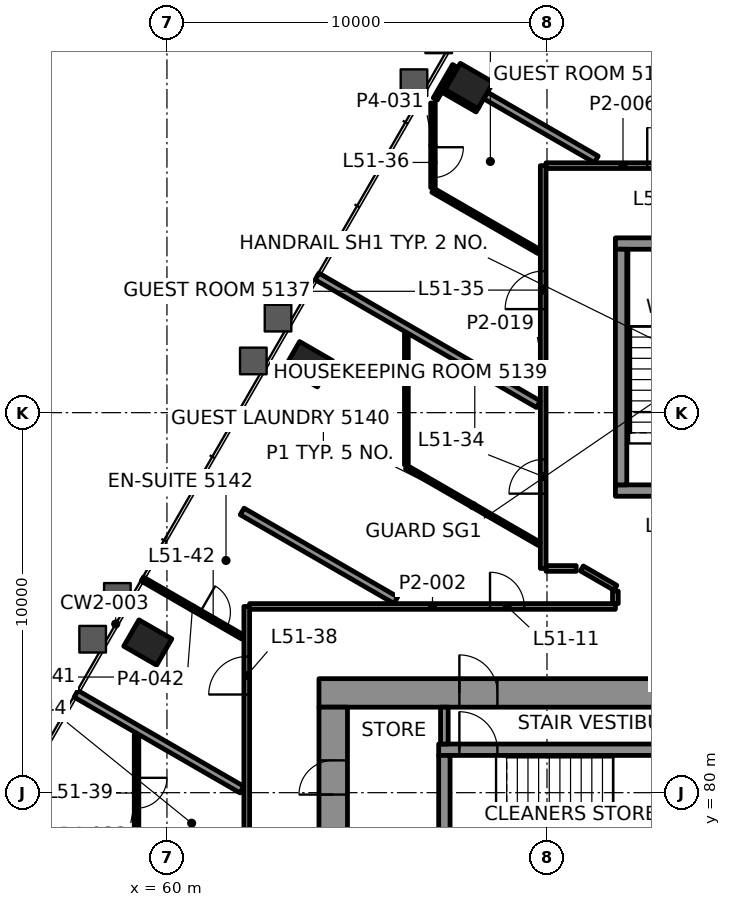
"""IFC4 building model, lengths in metres.
Left out: names, types, materials, properties, quantities, classifications, styles, units other than length and angle.
Written with IfcOpenShell. Run it as: python <this file> out.ifc"""

import sys

from ifc_helpers import new_model, si_unit, direction, frame, frame_2d, origin, origin_2d, place, context, subcontext, project, spatial, rectangle, hollow_rectangle, extrude, element, fill, save


model = new_model("IFC4")
c1 = context("Model", 3, precision=1e-05, world=origin(), true_north=direction((0.0, 1.0)))
c2 = subcontext(c1, "Body", "Model", "MODEL_VIEW")
j1 = project(units=[si_unit("LENGTHUNIT", "METRE"), si_unit("PLANEANGLEUNIT", "RADIAN")], contexts=[c1])
p1 = place(None, origin())
s1 = spatial("IfcSite", under=j1, at=p1, CompositionType="ELEMENT")
p2 = place(p1, origin())
s2 = spatial("IfcBuilding", under=s1, at=p2, CompositionType="ELEMENT")
p3 = place(p2, frame((0.0, 0.0, 218.2)))
s3 = spatial("IfcBuildingStorey", under=s2, at=p3, CompositionType="ELEMENT", Elevation=218.2)
for number, where, z_axis, x_axis in (
    (1, (67.952, 98.597, -0.0), (0.0, 0.0, 1.0), (-0.5, -0.866, 0.0)),
    (2, (63.724, 91.274, -0.0), (0.0, 0.0, 1.0), (-0.5, -0.866, 0.0)),
    (3, (59.496, 83.951, -0.0), (0.0, 0.0, 1.0), (-0.5, -0.866, 0.0)),
):
    element("IfcColumn", number, at=place(p3, frame(where, z_axis=z_axis, x_axis=x_axis)), inside=s3, PredefinedType="COLUMN", context=c2, shape_type="SweptSolid", body=[
        extrude(hollow_rectangle(XDim=0.8, YDim=1.0, WallThickness=0.05, at=origin_2d()), origin(), (0.0, 0.0, 1.0), 3.9),
    ])
p4 = place(p3, frame((64.0, 82.625, 0.0), z_axis=(0.0, 0.0, 1.0), x_axis=(1.0, 0.0, 0.0)))
e4 = element("IfcWall", 4, at=p4, inside=s3, PredefinedType="SHEAR", context=c2, shape_type="SweptSolid", body=[
    extrude(rectangle(XDim=22.0, YDim=0.75, at=frame_2d((11.0, 0.0))), origin(), (0.0, 0.0, 1.0), 3.7),
])
p5 = place(p4, frame((3.695, 0.0, 0.0)))
e5 = element("IfcOpeningElement", 5, at=p5, cuts=e4, PredefinedType="OPENING", context=c2, shape_type="SweptSolid", body=[
    extrude(rectangle(XDim=1.0, YDim=2.1, at=frame_2d((0.5, 1.05))), frame((0.0, 0.385, 0.0), z_axis=(0.0, -1.0, 0.0), x_axis=(1.0, 0.0, 0.0)), (0.0, 0.0, 1.0), 0.77),
])
p6 = place(p4, frame((17.505, 0.0, 0.0)))
e6 = element("IfcOpeningElement", 6, at=p6, cuts=e4, PredefinedType="OPENING", context=c2, shape_type="SweptSolid", body=[
    extrude(rectangle(XDim=1.0, YDim=2.1, at=frame_2d((0.5, 1.05))), frame((0.0, 0.385, 0.0), z_axis=(0.0, -1.0, 0.0), x_axis=(1.0, 0.0, 0.0)), (0.0, 0.0, 1.0), 0.77),
])
p7 = place(p4, frame((10.65, 0.0, 0.0)))
e7 = element("IfcOpeningElement", 7, at=p7, cuts=e4, PredefinedType="OPENING", context=c2, shape_type="SweptSolid", body=[
    extrude(rectangle(XDim=0.9, YDim=2.1, at=frame_2d((0.45, 1.05))), frame((0.0, 0.385, 0.0), z_axis=(0.0, -1.0, 0.0), x_axis=(1.0, 0.0, 0.0)), (0.0, 0.0, 1.0), 0.77),
])
p8 = place(p3, frame((64.375, 67.75, 0.0), z_axis=(0.0, 0.0, 1.0), x_axis=(0.0, 1.0, 0.0)))
e8 = element("IfcWall", 8, at=p8, inside=s3, PredefinedType="SHEAR", context=c2, shape_type="SweptSolid", body=[
    extrude(rectangle(XDim=14.5, YDim=0.75, at=frame_2d((7.25, 0.0))), origin(), (0.0, 0.0, 1.0), 3.7),
])
p9 = place(p8, frame((4.65, 0.0, 0.0)))
e9 = element("IfcOpeningElement", 9, at=p9, cuts=e8, PredefinedType="OPENING", context=c2, shape_type="SweptSolid", body=[
    extrude(rectangle(XDim=1.8, YDim=2.1, at=frame_2d((0.9, 1.05))), frame((0.0, 0.385, 0.0), z_axis=(0.0, -1.0, 0.0), x_axis=(1.0, 0.0, 0.0)), (0.0, 0.0, 1.0), 0.77),
])
p10 = place(p8, frame((8.5, 0.0, 0.0)))
e10 = element("IfcOpeningElement", 10, at=p10, cuts=e8, PredefinedType="OPENING", context=c2, shape_type="SweptSolid", body=[
    extrude(rectangle(XDim=0.9, YDim=2.1, at=frame_2d((0.45, 1.05))), frame((0.0, 0.385, 0.0), z_axis=(0.0, -1.0, 0.0), x_axis=(1.0, 0.0, 0.0)), (0.0, 0.0, 1.0), 0.77),
])
p11 = place(p8, frame((12.2, 0.0, 0.0)))
e11 = element("IfcOpeningElement", 11, at=p11, cuts=e8, PredefinedType="OPENING", context=c2, shape_type="SweptSolid", body=[
    extrude(rectangle(XDim=0.9, YDim=2.1, at=frame_2d((0.45, 1.05))), frame((0.0, 0.385, 0.0), z_axis=(0.0, -1.0, 0.0), x_axis=(1.0, 0.0, 0.0)), (0.0, 0.0, 1.0), 0.77),
])
p12 = place(p3, frame((67.15, 81.13, 0.0), z_axis=(0.0, 0.0, 1.0), x_axis=(1.0, 0.0, 0.0)))
e12 = element("IfcWall", 12, at=p12, inside=s3, PredefinedType="SHEAR", context=c2, shape_type="SweptSolid", body=[
    extrude(rectangle(XDim=6.91, YDim=0.3, at=frame_2d((3.455, 0.0))), origin(), (0.0, 0.0, 1.0), 3.7),
])
p13 = place(p12, frame((0.545, 0.0, 0.0)))
e13 = element("IfcOpeningElement", 13, at=p13, cuts=e12, PredefinedType="OPENING", context=c2, shape_type="SweptSolid", body=[
    extrude(rectangle(XDim=1.0, YDim=2.1, at=frame_2d((0.5, 1.05))), frame((0.0, 0.16, 0.0), z_axis=(0.0, -1.0, 0.0), x_axis=(1.0, 0.0, 0.0)), (0.0, 0.0, 1.0), 0.32),
])
p14 = place(p3, frame((67.3, 77.9, 0.0), z_axis=(0.0, 0.0, 1.0), x_axis=(0.0, 1.0, 0.0)))
e14 = element("IfcWall", 14, at=p14, inside=s3, PredefinedType="SHEAR", context=c2, shape_type="SweptSolid", body=[
    extrude(rectangle(XDim=3.08, YDim=0.3, at=frame_2d((1.54, 0.0))), origin(), (0.0, 0.0, 1.0), 3.7),
])
p15 = place(p3, frame((71.8, 87.95, 0.0), z_axis=(0.0, 0.0, 1.0), x_axis=(1.0, 0.0, 0.0)))
e15 = element("IfcWall", 15, at=p15, inside=s3, PredefinedType="SHEAR", context=c2, shape_type="SweptSolid", body=[
    extrude(rectangle(XDim=6.4, YDim=0.3, at=frame_2d((3.2, 0.0))), origin(), (0.0, 0.0, 1.0), 3.7),
])
p16 = place(p15, frame((1.325, 0.0, 0.0)))
e16 = element("IfcOpeningElement", 16, at=p16, cuts=e15, PredefinedType="OPENING", context=c2, shape_type="SweptSolid", body=[
    extrude(rectangle(XDim=1.0, YDim=2.1, at=frame_2d((0.5, 1.05))), frame((0.0, 0.16, 0.0), z_axis=(0.0, -1.0, 0.0), x_axis=(1.0, 0.0, 0.0)), (0.0, 0.0, 1.0), 0.32),
])
p17 = place(p15, frame((4.125, 0.0, 0.0)))
e17 = element("IfcOpeningElement", 17, at=p17, cuts=e15, PredefinedType="OPENING", context=c2, shape_type="SweptSolid", body=[
    extrude(rectangle(XDim=1.2, YDim=2.1, at=frame_2d((0.6, 1.05))), frame((0.0, 0.16, 0.0), z_axis=(0.0, -1.0, 0.0), x_axis=(1.0, 0.0, 0.0)), (0.0, 0.0, 1.0), 0.32),
])
p18 = place(p3, frame((71.8, 94.45, 0.0), z_axis=(0.0, 0.0, 1.0), x_axis=(1.0, 0.0, 0.0)))
e18 = element("IfcWall", 18, at=p18, inside=s3, PredefinedType="SHEAR", context=c2, shape_type="SweptSolid", body=[
    extrude(rectangle(XDim=6.4, YDim=0.3, at=frame_2d((3.2, 0.0))), origin(), (0.0, 0.0, 1.0), 3.7),
])
p19 = place(p3, frame((71.95, 88.1, 0.0), z_axis=(0.0, 0.0, 1.0), x_axis=(0.0, 1.0, 0.0)))
e19 = element("IfcWall", 19, at=p19, inside=s3, PredefinedType="SHEAR", context=c2, shape_type="SweptSolid", body=[
    extrude(rectangle(XDim=6.2, YDim=0.3, at=frame_2d((3.1, 0.0))), origin(), (0.0, 0.0, 1.0), 3.7),
])
p20 = place(p3, frame((62.175, 84.9, 0.0), z_axis=(0.0, 0.0, 1.0), x_axis=(1.0, 0.0, 0.0)))
e20 = element("IfcWall", 20, at=p20, inside=s3, PredefinedType="PARTITIONING", context=c2, shape_type="SweptSolid", body=[
    extrude(rectangle(XDim=9.625, YDim=0.15, at=frame_2d((4.812, 0.0))), origin(), (0.0, 0.0, 1.0), 3.097),
])
p21 = place(p20, frame((6.326, 0.0, 0.0)))
e21 = element("IfcOpeningElement", 21, at=p21, cuts=e20, PredefinedType="OPENING", context=c2, shape_type="SweptSolid", body=[
    extrude(rectangle(XDim=0.9, YDim=2.1, at=frame_2d((0.45, 1.05))), frame((0.0, 0.085, 0.0), z_axis=(0.0, -1.0, 0.0), x_axis=(1.0, 0.0, 0.0)), (0.0, 0.0, 1.0), 0.17),
])
p22 = place(p3, frame((69.976, 85.9, 0.0), z_axis=(0.0, 0.0, 1.0), x_axis=(1.0, 0.0, 0.0)))
e22 = element("IfcWall", 22, at=p22, inside=s3, PredefinedType="PARTITIONING", context=c2, shape_type="SweptSolid", body=[
    extrude(rectangle(XDim=0.792, YDim=0.15, at=frame_2d((0.396, 0.0))), origin(), (0.0, 0.0, 1.0), 3.097),
])
p23 = place(p3, frame((69.975, 96.5, 0.0), z_axis=(0.0, 0.0, 1.0), x_axis=(1.0, 0.0, 0.0)))
e23 = element("IfcWall", 23, at=p23, inside=s3, PredefinedType="PARTITIONING", context=c2, shape_type="SweptSolid", body=[
    extrude(rectangle(XDim=4.05, YDim=0.15, at=frame_2d((2.025, 0.0))), origin(), (0.0, 0.0, 1.0), 3.1),
])
p24 = place(p23, frame((2.663, 0.0, 0.0)))
e24 = element("IfcOpeningElement", 24, at=p24, cuts=e23, PredefinedType="OPENING", context=c2, shape_type="SweptSolid", body=[
    extrude(rectangle(XDim=1.0, YDim=2.1, at=frame_2d((0.5, 1.05))), frame((0.0, 0.085, 0.0), z_axis=(0.0, -1.0, 0.0), x_axis=(1.0, 0.0, 0.0)), (0.0, 0.0, 1.0), 0.17),
])
p25 = place(p3, frame((67.06, 98.253, 0.0), z_axis=(0.0, 0.0, 1.0), x_axis=(0.499972622635, 0.866041209536, 0.0)))
e25 = element("IfcWall", 25, at=p25, inside=s3, PredefinedType="PARTITIONING", context=c2, shape_type="SweptSolid", body=[
    extrude(rectangle(XDim=1.014, YDim=0.12, at=frame_2d((0.507, 0.0))), origin(), (0.0, 0.0, 1.0), 3.1),
])
p26 = place(p3, frame((71.8, 84.975, 0.0), z_axis=(0.0, 0.0, 1.0), x_axis=(0.0, 1.0, 0.0)))
e26 = element("IfcWall", 26, at=p26, inside=s3, PredefinedType="PARTITIONING", context=c2, shape_type="SweptSolid", body=[
    extrude(rectangle(XDim=0.329, YDim=0.15, at=frame_2d((0.165, 0.0))), origin(), (0.0, 0.0, 1.0), 3.1),
])
p27 = place(p3, frame((69.9, 85.9, 0.0), z_axis=(0.0, 0.0, 1.0), x_axis=(0.0, 1.0, 0.0)))
e27 = element("IfcWall", 27, at=p27, inside=s3, PredefinedType="PARTITIONING", context=c2, shape_type="SweptSolid", body=[
    extrude(rectangle(XDim=10.6, YDim=0.15, at=frame_2d((5.3, 0.0))), origin(), (0.0, 0.0, 1.0), 3.097),
])
p28 = place(p27, frame((1.968, 0.0, 0.0)))
e28 = element("IfcOpeningElement", 28, at=p28, cuts=e27, PredefinedType="OPENING", context=c2, shape_type="SweptSolid", body=[
    extrude(rectangle(XDim=0.9, YDim=2.1, at=frame_2d((0.45, 1.05))), frame((0.0, 0.085, 0.0), z_axis=(0.0, -1.0, 0.0), x_axis=(1.0, 0.0, 0.0)), (0.0, 0.0, 1.0), 0.17),
])
p29 = place(p27, frame((6.825, 0.0, 0.0)))
e29 = element("IfcOpeningElement", 29, at=p29, cuts=e27, PredefinedType="OPENING", context=c2, shape_type="SweptSolid", body=[
    extrude(rectangle(XDim=1.0, YDim=2.1, at=frame_2d((0.5, 1.05))), frame((0.0, 0.085, 0.0), z_axis=(0.0, -1.0, 0.0), x_axis=(1.0, 0.0, 0.0)), (0.0, 0.0, 1.0), 0.17),
])
p30 = place(p3, frame((67.0, 98.149, 0.0), z_axis=(0.0, 0.0, 1.0), x_axis=(0.0, -1.0, 0.0)))
e30 = element("IfcWall", 30, at=p30, inside=s3, PredefinedType="PARTITIONING", context=c2, shape_type="SweptSolid", body=[
    extrude(rectangle(XDim=2.228, YDim=0.12, at=frame_2d((1.114, 0.0))), origin(), (0.0, 0.0, 1.0), 3.022),
])
p31 = place(p30, frame((1.164, 0.0, 0.0)))
e31 = element("IfcOpeningElement", 31, at=p31, cuts=e30, PredefinedType="OPENING", context=c2, shape_type="SweptSolid", body=[
    extrude(rectangle(XDim=0.8, YDim=2.1, at=frame_2d((0.4, 1.05))), frame((0.0, 0.07, 0.0), z_axis=(0.0, -1.0, 0.0), x_axis=(1.0, 0.0, 0.0)), (0.0, 0.0, 1.0), 0.14),
])
p32 = place(p3, frame((66.3, 88.624, 0.0), z_axis=(0.0, 0.0, 1.0), x_axis=(0.0, 1.0, 0.0)))
e32 = element("IfcWall", 32, at=p32, inside=s3, PredefinedType="PARTITIONING", context=c2, shape_type="SweptSolid", body=[
    extrude(rectangle(XDim=3.458, YDim=0.1, at=frame_2d((1.729, 0.0))), origin(), (0.0, 0.0, 1.0), 3.1),
])
p33 = place(p3, frame((62.1, 68.591, 0.0), z_axis=(0.0, 0.0, 1.0), x_axis=(0.0, 1.0, 0.0)))
e33 = element("IfcWall", 33, at=p33, inside=s3, PredefinedType="PARTITIONING", context=c2, shape_type="SweptSolid", body=[
    extrude(rectangle(XDim=16.309, YDim=0.15, at=frame_2d((8.154, 0.0))), origin(), (0.0, 0.0, 1.0), 3.1),
])
p34 = place(p33, frame((6.668, 0.0, 0.0)))
e34 = element("IfcOpeningElement", 34, at=p34, cuts=e33, PredefinedType="OPENING", context=c2, shape_type="SweptSolid", body=[
    extrude(rectangle(XDim=1.0, YDim=2.1, at=frame_2d((0.5, 1.05))), frame((0.0, 0.085, 0.0), z_axis=(0.0, -1.0, 0.0), x_axis=(1.0, 0.0, 0.0)), (0.0, 0.0, 1.0), 0.17),
])
p35 = place(p33, frame((13.991, 0.0, 0.0)))
e35 = element("IfcOpeningElement", 35, at=p35, cuts=e33, PredefinedType="OPENING", context=c2, shape_type="SweptSolid", body=[
    extrude(rectangle(XDim=1.0, YDim=2.1, at=frame_2d((0.5, 1.05))), frame((0.0, 0.085, 0.0), z_axis=(0.0, -1.0, 0.0), x_axis=(1.0, 0.0, 0.0)), (0.0, 0.0, 1.0), 0.17),
])
p36 = place(p3, frame((59.2, 81.526, 0.0), z_axis=(0.0, 0.0, 1.0), x_axis=(0.0, -1.0, 0.0)))
e36 = element("IfcWall", 36, at=p36, inside=s3, PredefinedType="PARTITIONING", context=c2, shape_type="SweptSolid", body=[
    extrude(rectangle(XDim=3.07, YDim=0.12, at=frame_2d((1.535, 0.0))), origin(), (0.0, 0.0, 1.0), 3.1),
])
p37 = place(p36, frame((1.135, 0.0, 0.0)))
e37 = element("IfcOpeningElement", 37, at=p37, cuts=e36, PredefinedType="OPENING", context=c2, shape_type="SweptSolid", body=[
    extrude(rectangle(XDim=0.8, YDim=2.1, at=frame_2d((0.4, 1.05))), frame((0.0, 0.07, 0.0), z_axis=(0.0, -1.0, 0.0), x_axis=(1.0, 0.0, 0.0)), (0.0, 0.0, 1.0), 0.14),
])
p38 = place(p3, frame((71.298, 96.665, 0.0), z_axis=(0.0, 0.0, 1.0), x_axis=(-0.866023625329, 0.500003080363, 0.0)))
e38 = element("IfcWall", 38, at=p38, inside=s3, PredefinedType="PARTITIONING", context=c2, shape_type="SweptSolid", body=[
    extrude(rectangle(XDim=3.364, YDim=0.2, at=frame_2d((1.682, 0.0))), origin(), (0.0, 0.0, 1.0), 3.1),
])
p39 = place(p3, frame((68.185, 98.0, 0.0), z_axis=(0.0, 0.0, 1.0), x_axis=(-0.866071776036, 0.499919672301, 0.0)))
e39 = element("IfcWall", 39, at=p39, inside=s3, PredefinedType="PARTITIONING", context=c2, shape_type="SweptSolid", body=[
    extrude(rectangle(XDim=1.0, YDim=0.2, at=frame_2d((0.5, 0.0))), origin(), (0.0, 0.0, 1.0), 3.022),
])
p40 = place(p3, frame((69.79, 94.24, 0.0), z_axis=(0.0, 0.0, 1.0), x_axis=(-0.86604299788, 0.499969524894, 0.0)))
e40 = element("IfcWall", 40, at=p40, inside=s3, PredefinedType="PARTITIONING", context=c2, shape_type="SweptSolid", body=[
    extrude(rectangle(XDim=3.222, YDim=0.12, at=frame_2d((1.611, 0.0))), origin(), (0.0, 0.0, 1.0), 3.1),
])
p41 = place(p3, frame((69.773, 90.222, 0.0), z_axis=(0.0, 0.0, 1.0), x_axis=(-0.866027185264, 0.499996914373, 0.0)))
e41 = element("IfcWall", 41, at=p41, inside=s3, PredefinedType="PARTITIONING", context=c2, shape_type="SweptSolid", body=[
    extrude(rectangle(XDim=6.725, YDim=0.2, at=frame_2d((3.362, 0.0))), origin(), (0.0, 0.0, 1.0), 3.022),
])
p42 = place(p3, frame((71.8, 85.391, 0.0), z_axis=(0.0, 0.0, 1.0), x_axis=(-0.866021929094, 0.500006018292, 0.0)))
e42 = element("IfcWall", 42, at=p42, inside=s3, PredefinedType="PARTITIONING", context=c2, shape_type="SweptSolid", body=[
    extrude(rectangle(XDim=1.019, YDim=0.15, at=frame_2d((0.509, 0.0))), origin(), (0.0, 0.0, 1.0), 3.1),
])
p43 = place(p3, frame((69.799, 86.546, 0.0), z_axis=(0.0, 0.0, 1.0), x_axis=(-0.866025579307, 0.499999695987, 0.0)))
e43 = element("IfcWall", 43, at=p43, inside=s3, PredefinedType="PARTITIONING", context=c2, shape_type="SweptSolid", body=[
    extrude(rectangle(XDim=4.04, YDim=0.1, at=frame_2d((2.02, 0.0))), origin(), (0.0, 0.0, 1.0), 3.1),
])
p44 = place(p3, frame((66.023, 85.065, 0.0), z_axis=(0.0, 0.0, 1.0), x_axis=(-0.866034108906, 0.499984921984, 0.0)))
e44 = element("IfcWall", 44, at=p44, inside=s3, PredefinedType="PARTITIONING", context=c2, shape_type="SweptSolid", body=[
    extrude(rectangle(XDim=4.67, YDim=0.2, at=frame_2d((2.335, 0.0))), origin(), (0.0, 0.0, 1.0), 3.1),
])
p45 = place(p3, frame((59.352, 85.621, 0.0), z_axis=(0.0, 0.0, 1.0), x_axis=(0.866010799848, -0.500025293908, 0.0)))
e45 = element("IfcWall", 45, at=p45, inside=s3, PredefinedType="PARTITIONING", context=c2, shape_type="SweptSolid", body=[
    extrude(rectangle(XDim=3.047, YDim=0.12, at=frame_2d((1.523, 0.0))), origin(), (0.0, 0.0, 1.0), 3.022),
])
p46 = place(p45, frame((1.753, 0.0, 0.0)))
e46 = element("IfcOpeningElement", 46, at=p46, cuts=e45, PredefinedType="OPENING", context=c2, shape_type="SweptSolid", body=[
    extrude(rectangle(XDim=0.8, YDim=2.1, at=frame_2d((0.4, 1.05))), frame((0.0, 0.07, 0.0), z_axis=(0.0, -1.0, 0.0), x_axis=(1.0, 0.0, 0.0)), (0.0, 0.0, 1.0), 0.14),
])
p47 = place(p3, frame((61.973, 80.08, 0.0), z_axis=(0.0, 0.0, 1.0), x_axis=(-0.866017018378, 0.500014523669, 0.0)))
e47 = element("IfcWall", 47, at=p47, inside=s3, PredefinedType="PARTITIONING", context=c2, shape_type="SweptSolid", body=[
    extrude(rectangle(XDim=5.041, YDim=0.2, at=frame_2d((2.521, 0.0))), origin(), (0.0, 0.0, 1.0), 3.022),
])
p48 = place(p3, frame((67.3, 81.28, 0.0), z_axis=(0.0, 0.0, 1.0), x_axis=(0.0, 1.0, 0.0)))
e48 = element("IfcWall", 48, at=p48, inside=s3, PredefinedType="PARTITIONING", context=c2, shape_type="SweptSolid", body=[
    extrude(rectangle(XDim=0.97, YDim=0.2, at=frame_2d((0.485, 0.0))), origin(), (0.0, 0.0, 1.0), 3.7),
])
p49 = place(p21, origin())
e49 = element("IfcDoor", 49, at=p49, inside=s3, OperationType="SINGLE_SWING_LEFT", PredefinedType="DOOR", context=c2, shape_type="SweptSolid", body=[
    extrude(rectangle(XDim=0.9, YDim=2.1, at=frame_2d((0.45, 1.05))), frame((0.0, 0.025, 0.0), z_axis=(0.0, -1.0, 0.0), x_axis=(1.0, 0.0, 0.0)), (0.0, 0.0, 1.0), 0.05),
])
fill(e21, e49)
p50 = place(p24, origin())
e50 = element("IfcDoor", 50, at=p50, inside=s3, OperationType="SINGLE_SWING_RIGHT", PredefinedType="DOOR", context=c2, shape_type="SweptSolid", body=[
    extrude(rectangle(XDim=1.0, YDim=2.1, at=frame_2d((0.5, 1.05))), frame((0.0, 0.025, 0.0), z_axis=(0.0, -1.0, 0.0), x_axis=(1.0, 0.0, 0.0)), (0.0, 0.0, 1.0), 0.05),
])
fill(e24, e50)
p51 = place(p28, origin())
e51 = element("IfcDoor", 51, at=p51, inside=s3, OperationType="SINGLE_SWING_RIGHT", PredefinedType="DOOR", context=c2, shape_type="SweptSolid", body=[
    extrude(rectangle(XDim=0.9, YDim=2.1, at=frame_2d((0.45, 1.05))), frame((0.0, 0.025, 0.0), z_axis=(0.0, -1.0, 0.0), x_axis=(1.0, 0.0, 0.0)), (0.0, 0.0, 1.0), 0.05),
])
fill(e28, e51)
p52 = place(p29, origin())
e52 = element("IfcDoor", 52, at=p52, inside=s3, OperationType="SINGLE_SWING_RIGHT", PredefinedType="DOOR", context=c2, shape_type="SweptSolid", body=[
    extrude(rectangle(XDim=1.0, YDim=2.1, at=frame_2d((0.5, 1.05))), frame((0.0, 0.025, 0.0), z_axis=(0.0, -1.0, 0.0), x_axis=(1.0, 0.0, 0.0)), (0.0, 0.0, 1.0), 0.05),
])
fill(e29, e52)
p53 = place(p31, origin())
e53 = element("IfcDoor", 53, at=p53, inside=s3, OperationType="SINGLE_SWING_RIGHT", PredefinedType="DOOR", context=c2, shape_type="SweptSolid", body=[
    extrude(rectangle(XDim=0.8, YDim=2.1, at=frame_2d((0.4, 1.05))), frame((0.0, 0.025, 0.0), z_axis=(0.0, -1.0, 0.0), x_axis=(1.0, 0.0, 0.0)), (0.0, 0.0, 1.0), 0.05),
])
fill(e31, e53)
p54 = place(p35, origin())
e54 = element("IfcDoor", 54, at=p54, inside=s3, OperationType="SINGLE_SWING_RIGHT", PredefinedType="DOOR", context=c2, shape_type="SweptSolid", body=[
    extrude(rectangle(XDim=1.0, YDim=2.1, at=frame_2d((0.5, 1.05))), frame((0.0, 0.025, 0.0), z_axis=(0.0, -1.0, 0.0), x_axis=(1.0, 0.0, 0.0)), (0.0, 0.0, 1.0), 0.05),
])
fill(e35, e54)
p55 = place(p37, origin())
e55 = element("IfcDoor", 55, at=p55, inside=s3, OperationType="SINGLE_SWING_RIGHT", PredefinedType="DOOR", context=c2, shape_type="SweptSolid", body=[
    extrude(rectangle(XDim=0.8, YDim=2.1, at=frame_2d((0.4, 1.05))), frame((0.0, 0.025, 0.0), z_axis=(0.0, -1.0, 0.0), x_axis=(1.0, 0.0, 0.0)), (0.0, 0.0, 1.0), 0.05),
])
fill(e37, e55)
p56 = place(p46, origin())
e56 = element("IfcDoor", 56, at=p56, inside=s3, OperationType="SINGLE_SWING_RIGHT", PredefinedType="DOOR", context=c2, shape_type="SweptSolid", body=[
    extrude(rectangle(XDim=0.8, YDim=2.1, at=frame_2d((0.4, 1.05))), frame((0.0, 0.025, 0.0), z_axis=(0.0, -1.0, 0.0), x_axis=(1.0, 0.0, 0.0)), (0.0, 0.0, 1.0), 0.05),
])
fill(e46, e56)
p57 = place(p13, origin())
e57 = element("IfcDoor", 57, at=p57, inside=s3, OperationType="SINGLE_SWING_RIGHT", PredefinedType="DOOR", context=c2, shape_type="SweptSolid", body=[
    extrude(rectangle(XDim=1.0, YDim=2.1, at=frame_2d((0.5, 1.05))), frame((0.0, 0.025, 0.0), z_axis=(0.0, -1.0, 0.0), x_axis=(1.0, 0.0, 0.0)), (0.0, 0.0, 1.0), 0.05),
])
fill(e13, e57)
p58 = place(p5, origin())
e58 = element("IfcDoor", 58, at=p58, inside=s3, OperationType="SINGLE_SWING_LEFT", PredefinedType="DOOR", context=c2, shape_type="SweptSolid", body=[
    extrude(rectangle(XDim=1.0, YDim=2.1, at=frame_2d((0.5, 1.05))), frame((0.0, 0.095, 0.0), z_axis=(0.0, -1.0, 0.0), x_axis=(1.0, 0.0, 0.0)), (0.0, 0.0, 1.0), 0.19),
])
fill(e5, e58)
p59 = place(p11, origin())
e59 = element("IfcDoor", 59, at=p59, inside=s3, OperationType="SINGLE_SWING_LEFT", PredefinedType="DOOR", context=c2, shape_type="SweptSolid", body=[
    extrude(rectangle(XDim=0.9, YDim=2.1, at=frame_2d((0.45, 1.05))), frame((0.0, 0.095, 0.0), z_axis=(0.0, -1.0, 0.0), x_axis=(1.0, 0.0, 0.0)), (0.0, 0.0, 1.0), 0.19),
])
fill(e11, e59)
save(model, sys.argv[1])
